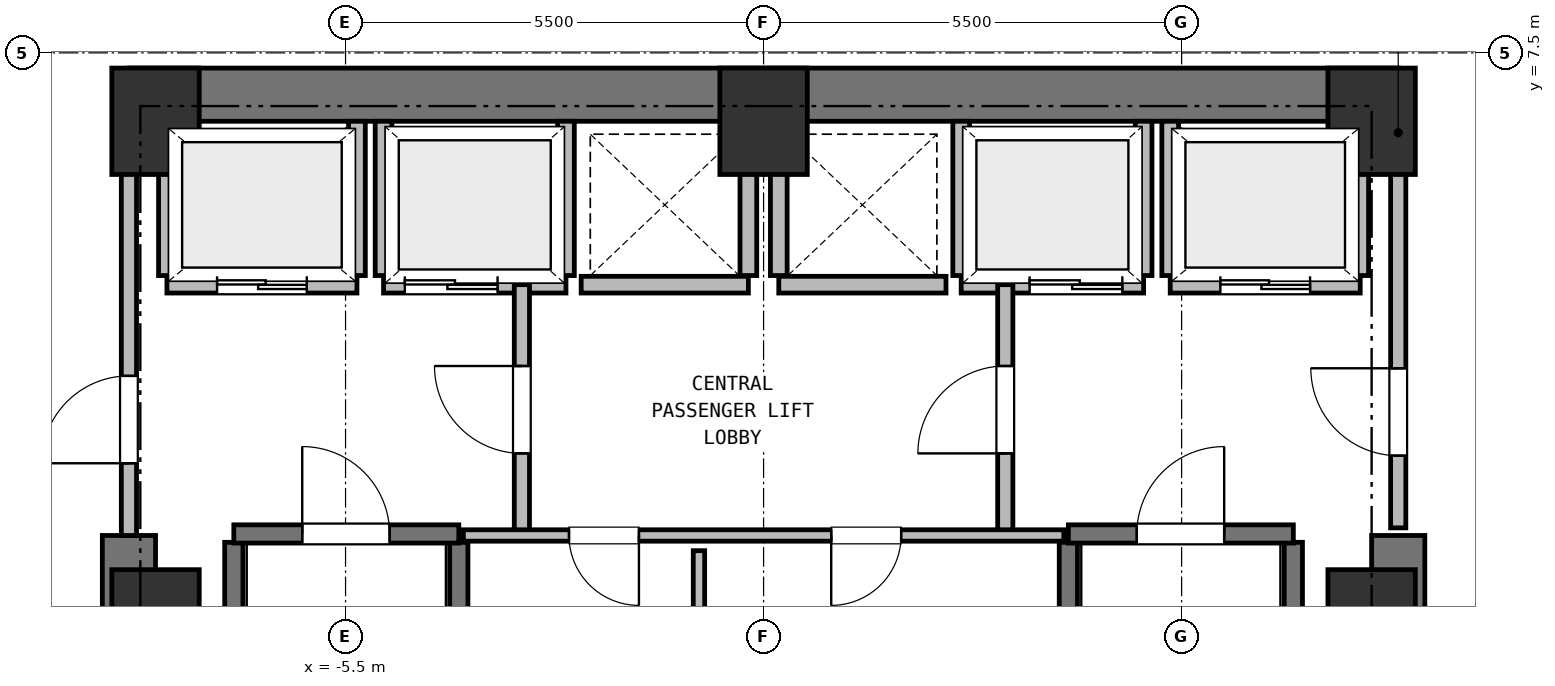
"""IFC4 building model, lengths in metres.
Left out: names, types, materials, properties, quantities, classifications, styles, units other than length and angle.
Written with IfcOpenShell. Run it as: python <this file> out.ifc"""

import sys

from ifc_helpers import new_model, si_unit, direction, frame, frame_2d, origin, origin_2d, place, context, subcontext, project, spatial, rectangle, extrude, element, fill, save


model = new_model("IFC4")
c1 = context("Model", 3, precision=1e-05, world=origin(), true_north=direction((0.0, 1.0)))
c2 = subcontext(c1, "Body", "Model", "MODEL_VIEW")
j1 = project(units=[si_unit("LENGTHUNIT", "METRE"), si_unit("PLANEANGLEUNIT", "RADIAN")], contexts=[c1])
p1 = place(None, origin())
s1 = spatial("IfcSite", under=j1, at=p1, CompositionType="ELEMENT")
p2 = place(p1, origin())
s2 = spatial("IfcBuilding", under=s1, at=p2, CompositionType="ELEMENT")
p3 = place(p2, frame((0.0, 0.0, 30.5)))
s3 = spatial("IfcBuildingStorey", under=s2, at=p3, CompositionType="ELEMENT", Elevation=30.5)
for number, where, z_axis, x_axis in (
    (1, (8.0, 0.0, 0.0), (0.0, 0.0, 1.0), (1.0, 0.0, 0.0)),
    (2, (8.0, 6.6, 0.0), (0.0, 0.0, 1.0), (1.0, 0.0, 0.0)),
    (3, (0.0, 6.6, 0.0), (0.0, 0.0, 1.0), (1.0, 0.0, 0.0)),
    (4, (-8.0, 6.6, 0.0), (0.0, 0.0, 1.0), (1.0, 0.0, 0.0)),
    (5, (-8.0, 0.0, 0.0), (0.0, 0.0, 1.0), (1.0, 0.0, 0.0)),
):
    element("IfcColumn", number, at=place(p3, frame(where, z_axis=z_axis, x_axis=x_axis)), inside=s3, PredefinedType="COLUMN", context=c2, shape_type="SweptSolid", body=[
        extrude(rectangle(XDim=1.15, YDim=1.4, at=origin_2d()), origin(), (0.0, 0.0, 1.0), 3.75),
    ])
p4 = place(p3, frame((-8.35, 6.95, 0.0), z_axis=(0.0, 0.0, 1.0), x_axis=(1.0, 0.0, 0.0)))
e6 = element("IfcWall", 6, at=p4, inside=s3, PredefinedType="SHEAR", context=c2, shape_type="SweptSolid", body=[
    extrude(rectangle(XDim=16.7, YDim=0.7, at=frame_2d((8.35, 0.0))), origin(), (0.0, 0.0, 1.0), 3.5),
])
for number, where, z_axis, x_axis in (
    (7, (-8.35, -6.95, 0.0), (0.0, 0.0, 1.0), (0.0, 1.0, 0.0)),
    (8, (8.35, -6.95, 0.0), (0.0, 0.0, 1.0), (0.0, 1.0, 0.0)),
):
    element("IfcWall", number, at=place(p3, frame(where, z_axis=z_axis, x_axis=x_axis)), inside=s3, PredefinedType="SHEAR", context=c2, shape_type="SweptSolid", body=[
        extrude(rectangle(XDim=8.1, YDim=0.7, at=frame_2d((4.05, 0.0))), origin(), (0.0, 0.0, 1.0), 3.5),
    ])
for number, where, z_axis, x_axis in (
    (9, (-6.97, -6.16, 0.0), (0.0, 0.0, 1.0), (0.0, 1.0, 0.0)),
    (10, (-4.01, -6.16, 0.0), (0.0, 0.0, 1.0), (0.0, 1.0, 0.0)),
):
    element("IfcWall", number, at=place(p3, frame(where, z_axis=z_axis, x_axis=x_axis)), inside=s3, PredefinedType="SHEAR", context=c2, shape_type="SweptSolid", body=[
        extrude(rectangle(XDim=7.22, YDim=0.24, at=frame_2d((3.61, 0.0))), origin(), (0.0, 0.0, 1.0), 3.5),
    ])
p5 = place(p3, frame((-6.97, 1.17, 0.0), z_axis=(0.0, 0.0, 1.0), x_axis=(1.0, 0.0, 0.0)))
e11 = element("IfcWall", 11, at=p5, inside=s3, PredefinedType="SHEAR", context=c2, shape_type="SweptSolid", body=[
    extrude(rectangle(XDim=2.96, YDim=0.24, at=frame_2d((1.48, 0.0))), origin(), (0.0, 0.0, 1.0), 3.5),
])
p6 = place(p5, frame((0.9, 0.0, 0.0)))
e12 = element("IfcOpeningElement", 12, at=p6, cuts=e11, PredefinedType="OPENING", context=c2, shape_type="SweptSolid", body=[
    extrude(rectangle(XDim=1.15, YDim=2.15, at=frame_2d((0.575, 1.075))), frame((0.0, 0.13, 0.0), z_axis=(0.0, -1.0, 0.0), x_axis=(1.0, 0.0, 0.0)), (0.0, 0.0, 1.0), 0.26),
])
for number, where, z_axis, x_axis in (
    (13, (4.01, -6.16, 0.0), (0.0, 0.0, 1.0), (0.0, 1.0, 0.0)),
    (14, (6.97, -6.16, 0.0), (0.0, 0.0, 1.0), (0.0, 1.0, 0.0)),
):
    element("IfcWall", number, at=place(p3, frame(where, z_axis=z_axis, x_axis=x_axis)), inside=s3, PredefinedType="SHEAR", context=c2, shape_type="SweptSolid", body=[
        extrude(rectangle(XDim=7.22, YDim=0.24, at=frame_2d((3.61, 0.0))), origin(), (0.0, 0.0, 1.0), 3.5),
    ])
p7 = place(p3, frame((4.01, 1.17, 0.0), z_axis=(0.0, 0.0, 1.0), x_axis=(1.0, 0.0, 0.0)))
e15 = element("IfcWall", 15, at=p7, inside=s3, PredefinedType="SHEAR", context=c2, shape_type="SweptSolid", body=[
    extrude(rectangle(XDim=2.96, YDim=0.24, at=frame_2d((1.48, 0.0))), origin(), (0.0, 0.0, 1.0), 3.5),
])
p8 = place(p7, frame((0.9, 0.0, 0.0)))
e16 = element("IfcOpeningElement", 16, at=p8, cuts=e15, PredefinedType="OPENING", context=c2, shape_type="SweptSolid", body=[
    extrude(rectangle(XDim=1.15, YDim=2.15, at=frame_2d((0.575, 1.075))), frame((0.0, 0.13, 0.0), z_axis=(0.0, -1.0, 0.0), x_axis=(1.0, 0.0, 0.0)), (0.0, 0.0, 1.0), 0.26),
])
p9 = place(p3, frame((-7.85, 4.45, 0.0), z_axis=(0.0, 0.0, 1.0), x_axis=(1.0, 0.0, 0.0)))
e17 = element("IfcWall", 17, at=p9, inside=s3, PredefinedType="PARTITIONING", context=c2, shape_type="SweptSolid", body=[
    extrude(rectangle(XDim=2.5, YDim=0.22, at=frame_2d((1.25, 0.0))), origin(), (0.0, 0.0, 1.0), 3.5),
])
p10 = place(p9, frame((0.66, 0.0, 0.0)))
e18 = element("IfcOpeningElement", 18, at=p10, cuts=e17, PredefinedType="OPENING", context=c2, shape_type="SweptSolid", body=[
    extrude(rectangle(XDim=1.18, YDim=2.15, at=frame_2d((0.59, 1.075))), frame((0.0, 0.12, 0.0), z_axis=(0.0, -1.0, 0.0), x_axis=(1.0, 0.0, 0.0)), (0.0, 0.0, 1.0), 0.24),
])
p11 = place(p3, frame((-7.85, 4.57, 0.0), z_axis=(0.0, 0.0, 1.0), x_axis=(0.0, 1.0, 0.0)))
e19 = element("IfcWall", 19, at=p11, inside=s3, PredefinedType="PARTITIONING", context=c2, shape_type="SweptSolid", body=[
    extrude(rectangle(XDim=2.03, YDim=0.22, at=frame_2d((1.015, 0.0))), origin(), (0.0, 0.0, 1.0), 3.08),
])
p12 = place(p3, frame((-5.35, 4.57, 0.0), z_axis=(0.0, 0.0, 1.0), x_axis=(0.0, 1.0, 0.0)))
e20 = element("IfcWall", 20, at=p12, inside=s3, PredefinedType="PARTITIONING", context=c2, shape_type="SweptSolid", body=[
    extrude(rectangle(XDim=2.03, YDim=0.22, at=frame_2d((1.015, 0.0))), origin(), (0.0, 0.0, 1.0), 3.5),
])
p13 = place(p3, frame((5.35, 4.45, 0.0), z_axis=(0.0, 0.0, 1.0), x_axis=(1.0, 0.0, 0.0)))
e21 = element("IfcWall", 21, at=p13, inside=s3, PredefinedType="PARTITIONING", context=c2, shape_type="SweptSolid", body=[
    extrude(rectangle(XDim=2.5, YDim=0.22, at=frame_2d((1.25, 0.0))), origin(), (0.0, 0.0, 1.0), 3.5),
])
p14 = place(p13, frame((0.66, 0.0, 0.0)))
e22 = element("IfcOpeningElement", 22, at=p14, cuts=e21, PredefinedType="OPENING", context=c2, shape_type="SweptSolid", body=[
    extrude(rectangle(XDim=1.18, YDim=2.15, at=frame_2d((0.59, 1.075))), frame((0.0, 0.12, 0.0), z_axis=(0.0, -1.0, 0.0), x_axis=(1.0, 0.0, 0.0)), (0.0, 0.0, 1.0), 0.24),
])
p15 = place(p3, frame((5.35, 4.57, 0.0), z_axis=(0.0, 0.0, 1.0), x_axis=(0.0, 1.0, 0.0)))
e23 = element("IfcWall", 23, at=p15, inside=s3, PredefinedType="PARTITIONING", context=c2, shape_type="SweptSolid", body=[
    extrude(rectangle(XDim=2.03, YDim=0.22, at=frame_2d((1.015, 0.0))), origin(), (0.0, 0.0, 1.0), 3.5),
])
p16 = place(p3, frame((7.85, 4.57, 0.0), z_axis=(0.0, 0.0, 1.0), x_axis=(0.0, 1.0, 0.0)))
e24 = element("IfcWall", 24, at=p16, inside=s3, PredefinedType="PARTITIONING", context=c2, shape_type="SweptSolid", body=[
    extrude(rectangle(XDim=2.03, YDim=0.22, at=frame_2d((1.015, 0.0))), origin(), (0.0, 0.0, 1.0), 3.08),
])
p17 = place(p3, frame((-5.0, 4.45, 0.0), z_axis=(0.0, 0.0, 1.0), x_axis=(1.0, 0.0, 0.0)))
e25 = element("IfcWall", 25, at=p17, inside=s3, PredefinedType="PARTITIONING", context=c2, shape_type="SweptSolid", body=[
    extrude(rectangle(XDim=2.4, YDim=0.22, at=frame_2d((1.2, 0.0))), origin(), (0.0, 0.0, 1.0), 3.5),
])
p18 = place(p17, frame((0.28, 0.0, 0.0)))
e26 = element("IfcOpeningElement", 26, at=p18, cuts=e25, PredefinedType="OPENING", context=c2, shape_type="SweptSolid", body=[
    extrude(rectangle(XDim=1.22, YDim=2.15, at=frame_2d((0.61, 1.075))), frame((0.0, 0.12, 0.0), z_axis=(0.0, -1.0, 0.0), x_axis=(1.0, 0.0, 0.0)), (0.0, 0.0, 1.0), 0.24),
])
for number, where, z_axis, x_axis in (
    (27, (-5.0, 4.57, 0.0), (0.0, 0.0, 1.0), (0.0, 1.0, 0.0)),
    (28, (-2.6, 4.57, 0.0), (0.0, 0.0, 1.0), (0.0, 1.0, 0.0)),
):
    element("IfcWall", number, at=place(p3, frame(where, z_axis=z_axis, x_axis=x_axis)), inside=s3, PredefinedType="PARTITIONING", context=c2, shape_type="SweptSolid", body=[
        extrude(rectangle(XDim=2.03, YDim=0.22, at=frame_2d((1.015, 0.0))), origin(), (0.0, 0.0, 1.0), 3.5),
    ])
p19 = place(p3, frame((2.6, 4.45, 0.0), z_axis=(0.0, 0.0, 1.0), x_axis=(1.0, 0.0, 0.0)))
e29 = element("IfcWall", 29, at=p19, inside=s3, PredefinedType="PARTITIONING", context=c2, shape_type="SweptSolid", body=[
    extrude(rectangle(XDim=2.4, YDim=0.22, at=frame_2d((1.2, 0.0))), origin(), (0.0, 0.0, 1.0), 3.5),
])
p20 = place(p19, frame((0.9, 0.0, 0.0)))
e30 = element("IfcOpeningElement", 30, at=p20, cuts=e29, PredefinedType="OPENING", context=c2, shape_type="SweptSolid", body=[
    extrude(rectangle(XDim=1.22, YDim=2.15, at=frame_2d((0.61, 1.075))), frame((0.0, 0.12, 0.0), z_axis=(0.0, -1.0, 0.0), x_axis=(1.0, 0.0, 0.0)), (0.0, 0.0, 1.0), 0.24),
])
for number, where, z_axis, x_axis in (
    (31, (2.6, 4.57, 0.0), (0.0, 0.0, 1.0), (0.0, 1.0, 0.0)),
    (32, (5.0, 4.57, 0.0), (0.0, 0.0, 1.0), (0.0, 1.0, 0.0)),
):
    element("IfcWall", number, at=place(p3, frame(where, z_axis=z_axis, x_axis=x_axis)), inside=s3, PredefinedType="PARTITIONING", context=c2, shape_type="SweptSolid", body=[
        extrude(rectangle(XDim=2.03, YDim=0.22, at=frame_2d((1.015, 0.0))), origin(), (0.0, 0.0, 1.0), 3.5),
    ])
p21 = place(p3, frame((-2.4, 4.45, 0.0), z_axis=(0.0, 0.0, 1.0), x_axis=(1.0, 0.0, 0.0)))
e33 = element("IfcWall", 33, at=p21, inside=s3, PredefinedType="PARTITIONING", context=c2, shape_type="SweptSolid", body=[
    extrude(rectangle(XDim=2.2, YDim=0.22, at=frame_2d((1.1, 0.0))), origin(), (0.0, 0.0, 1.0), 3.5),
])
p22 = place(p3, frame((-0.2, 4.57, 0.0), z_axis=(0.0, 0.0, 1.0), x_axis=(0.0, 1.0, 0.0)))
e34 = element("IfcWall", 34, at=p22, inside=s3, PredefinedType="PARTITIONING", context=c2, shape_type="SweptSolid", body=[
    extrude(rectangle(XDim=2.03, YDim=0.22, at=frame_2d((1.015, 0.0))), origin(), (0.0, 0.0, 1.0), 3.5),
])
p23 = place(p3, frame((0.2, 4.45, 0.0), z_axis=(0.0, 0.0, 1.0), x_axis=(1.0, 0.0, 0.0)))
e35 = element("IfcWall", 35, at=p23, inside=s3, PredefinedType="PARTITIONING", context=c2, shape_type="SweptSolid", body=[
    extrude(rectangle(XDim=2.2, YDim=0.22, at=frame_2d((1.1, 0.0))), origin(), (0.0, 0.0, 1.0), 3.5),
])
p24 = place(p3, frame((0.2, 4.57, 0.0), z_axis=(0.0, 0.0, 1.0), x_axis=(0.0, 1.0, 0.0)))
e36 = element("IfcWall", 36, at=p24, inside=s3, PredefinedType="PARTITIONING", context=c2, shape_type="SweptSolid", body=[
    extrude(rectangle(XDim=2.03, YDim=0.22, at=frame_2d((1.015, 0.0))), origin(), (0.0, 0.0, 1.0), 3.5),
])
p25 = place(p3, frame((-3.18, 1.15, 0.0), z_axis=(0.0, 0.0, 1.0), x_axis=(0.0, 1.0, 0.0)))
e37 = element("IfcWall", 37, at=p25, inside=s3, PredefinedType="PARTITIONING", context=c2, shape_type="SweptSolid", body=[
    extrude(rectangle(XDim=3.3, YDim=0.2, at=frame_2d((1.65, 0.0))), origin(), (0.0, 0.0, 1.0), 3.5),
])
p26 = place(p25, frame((1.08, 0.0, 0.0)))
e38 = element("IfcOpeningElement", 38, at=p26, cuts=e37, PredefinedType="OPENING", context=c2, shape_type="SweptSolid", body=[
    extrude(rectangle(XDim=1.15, YDim=2.15, at=frame_2d((0.575, 1.075))), frame((0.0, 0.11, 0.0), z_axis=(0.0, -1.0, 0.0), x_axis=(1.0, 0.0, 0.0)), (0.0, 0.0, 1.0), 0.22),
])
p27 = place(p3, frame((3.18, 1.15, 0.0), z_axis=(0.0, 0.0, 1.0), x_axis=(0.0, 1.0, 0.0)))
e39 = element("IfcWall", 39, at=p27, inside=s3, PredefinedType="PARTITIONING", context=c2, shape_type="SweptSolid", body=[
    extrude(rectangle(XDim=3.3, YDim=0.2, at=frame_2d((1.65, 0.0))), origin(), (0.0, 0.0, 1.0), 3.5),
])
p28 = place(p27, frame((1.08, 0.0, 0.0)))
e40 = element("IfcOpeningElement", 40, at=p28, cuts=e39, PredefinedType="OPENING", context=c2, shape_type="SweptSolid", body=[
    extrude(rectangle(XDim=1.15, YDim=2.15, at=frame_2d((0.575, 1.075))), frame((0.0, 0.11, 0.0), z_axis=(0.0, -1.0, 0.0), x_axis=(1.0, 0.0, 0.0)), (0.0, 0.0, 1.0), 0.22),
])
p29 = place(p3, frame((-8.35, 1.15, 0.0), z_axis=(0.0, 0.0, 1.0), x_axis=(0.0, 1.0, 0.0)))
e41 = element("IfcWall", 41, at=p29, inside=s3, PredefinedType="PARTITIONING", context=c2, shape_type="SweptSolid", body=[
    extrude(rectangle(XDim=5.4, YDim=0.2, at=frame_2d((2.7, 0.0))), origin(), (0.0, 0.0, 1.0), 3.5),
])
p30 = place(p29, frame((0.95, 0.0, 0.0)))
e42 = element("IfcOpeningElement", 42, at=p30, cuts=e41, PredefinedType="OPENING", context=c2, shape_type="SweptSolid", body=[
    extrude(rectangle(XDim=1.15, YDim=2.15, at=frame_2d((0.575, 1.075))), frame((0.0, 0.11, 0.0), z_axis=(0.0, -1.0, 0.0), x_axis=(1.0, 0.0, 0.0)), (0.0, 0.0, 1.0), 0.22),
])
p31 = place(p3, frame((8.35, 1.25, 0.0), z_axis=(0.0, 0.0, 1.0), x_axis=(0.0, 1.0, 0.0)))
e43 = element("IfcWall", 43, at=p31, inside=s3, PredefinedType="PARTITIONING", context=c2, shape_type="SweptSolid", body=[
    extrude(rectangle(XDim=5.3, YDim=0.2, at=frame_2d((2.65, 0.0))), origin(), (0.0, 0.0, 1.0), 3.5),
])
p32 = place(p31, frame((0.95, 0.0, 0.0)))
e44 = element("IfcOpeningElement", 44, at=p32, cuts=e43, PredefinedType="OPENING", context=c2, shape_type="SweptSolid", body=[
    extrude(rectangle(XDim=1.15, YDim=2.15, at=frame_2d((0.575, 1.075))), frame((0.0, 0.11, 0.0), z_axis=(0.0, -1.0, 0.0), x_axis=(1.0, 0.0, 0.0)), (0.0, 0.0, 1.0), 0.22),
])
p33 = place(p3, frame((3.95, 1.15, 0.0), z_axis=(0.0, 0.0, 1.0), x_axis=(-1.0, 0.0, 0.0)))
e45 = element("IfcWall", 45, at=p33, inside=s3, PredefinedType="PARTITIONING", context=c2, shape_type="SweptSolid", body=[
    extrude(rectangle(XDim=7.9, YDim=0.15, at=frame_2d((3.95, 0.0))), origin(), (0.0, 0.0, 1.0), 3.5),
])
p34 = place(p33, frame((5.59, 0.0, 0.0)))
e46 = element("IfcOpeningElement", 46, at=p34, cuts=e45, PredefinedType="OPENING", context=c2, shape_type="SweptSolid", body=[
    extrude(rectangle(XDim=0.92, YDim=2.05, at=frame_2d((0.46, 1.025))), frame((0.0, 0.085, 0.0), z_axis=(0.0, -1.0, 0.0), x_axis=(1.0, 0.0, 0.0)), (0.0, 0.0, 1.0), 0.17),
])
p35 = place(p33, frame((2.14, 0.0, 0.0)))
e47 = element("IfcOpeningElement", 47, at=p35, cuts=e45, PredefinedType="OPENING", context=c2, shape_type="SweptSolid", body=[
    extrude(rectangle(XDim=0.92, YDim=2.05, at=frame_2d((0.46, 1.025))), frame((0.0, 0.085, 0.0), z_axis=(0.0, -1.0, 0.0), x_axis=(1.0, 0.0, 0.0)), (0.0, 0.0, 1.0), 0.17),
])
p36 = place(p3, frame((-0.85, -4.08, 0.0), z_axis=(0.0, 0.0, 1.0), x_axis=(0.0, 1.0, 0.0)))
e48 = element("IfcWall", 48, at=p36, inside=s3, PredefinedType="PARTITIONING", context=c2, shape_type="SweptSolid", body=[
    extrude(rectangle(XDim=5.03, YDim=0.15, at=frame_2d((2.515, 0.0))), origin(), (0.0, 0.0, 1.0), 3.5),
])
for number, where, z_axis, x_axis in (
    (49, (8.578, 9.352, 0.0), (0.0, 0.0, 1.0), (0.707, -0.707, 0.0)),
    (50, (-10.752, 7.178, 0.0), (0.0, 0.0, 1.0), (0.707, 0.707, 0.0)),
):
    element("IfcWall", number, at=place(p3, frame(where, z_axis=z_axis, x_axis=x_axis)), inside=s3, PredefinedType="PARTITIONING", context=c2, shape_type="SweptSolid", body=[
        extrude(rectangle(XDim=3.074, YDim=0.15, at=frame_2d((1.537, 0.0))), origin(), (0.0, 0.0, 1.0), 3.5),
    ])
p37 = place(p6, origin())
e51 = element("IfcDoor", 51, at=p37, inside=s3, OperationType="SINGLE_SWING_LEFT", PredefinedType="DOOR", context=c2, shape_type="SweptSolid", body=[
    extrude(rectangle(XDim=1.15, YDim=2.15, at=frame_2d((0.575, 1.075))), frame((0.0, 0.025, 0.0), z_axis=(0.0, -1.0, 0.0), x_axis=(1.0, 0.0, 0.0)), (0.0, 0.0, 1.0), 0.05),
])
fill(e12, e51)
p38 = place(p8, origin())
e52 = element("IfcDoor", 52, at=p38, inside=s3, OperationType="SINGLE_SWING_RIGHT", PredefinedType="DOOR", context=c2, shape_type="SweptSolid", body=[
    extrude(rectangle(XDim=1.15, YDim=2.15, at=frame_2d((0.575, 1.075))), frame((0.0, 0.025, 0.0), z_axis=(0.0, -1.0, 0.0), x_axis=(1.0, 0.0, 0.0)), (0.0, 0.0, 1.0), 0.05),
])
fill(e16, e52)
p39 = place(p10, origin())
e53 = element("IfcDoor", 53, at=p39, inside=s3, OperationType="DOUBLE_DOOR_SLIDING", PredefinedType="DOOR", context=c2, shape_type="SweptSolid", body=[
    extrude(rectangle(XDim=1.18, YDim=2.15, at=frame_2d((0.59, 1.075))), frame((0.0, 0.025, 0.0), z_axis=(0.0, -1.0, 0.0), x_axis=(1.0, 0.0, 0.0)), (0.0, 0.0, 1.0), 0.05),
])
fill(e18, e53)
p40 = place(p14, origin())
e54 = element("IfcDoor", 54, at=p40, inside=s3, OperationType="DOUBLE_DOOR_SLIDING", PredefinedType="DOOR", context=c2, shape_type="SweptSolid", body=[
    extrude(rectangle(XDim=1.18, YDim=2.15, at=frame_2d((0.59, 1.075))), frame((0.0, 0.025, 0.0), z_axis=(0.0, -1.0, 0.0), x_axis=(1.0, 0.0, 0.0)), (0.0, 0.0, 1.0), 0.05),
])
fill(e22, e54)
p41 = place(p18, origin())
e55 = element("IfcDoor", 55, at=p41, inside=s3, OperationType="DOUBLE_DOOR_SLIDING", PredefinedType="DOOR", context=c2, shape_type="SweptSolid", body=[
    extrude(rectangle(XDim=1.22, YDim=2.15, at=frame_2d((0.61, 1.075))), frame((0.0, 0.025, 0.0), z_axis=(0.0, -1.0, 0.0), x_axis=(1.0, 0.0, 0.0)), (0.0, 0.0, 1.0), 0.05),
])
fill(e26, e55)
p42 = place(p20, origin())
e56 = element("IfcDoor", 56, at=p42, inside=s3, OperationType="DOUBLE_DOOR_SLIDING", PredefinedType="DOOR", context=c2, shape_type="SweptSolid", body=[
    extrude(rectangle(XDim=1.22, YDim=2.15, at=frame_2d((0.61, 1.075))), frame((0.0, 0.025, 0.0), z_axis=(0.0, -1.0, 0.0), x_axis=(1.0, 0.0, 0.0)), (0.0, 0.0, 1.0), 0.05),
])
fill(e30, e56)
p43 = place(p26, origin())
e57 = element("IfcDoor", 57, at=p43, inside=s3, OperationType="SINGLE_SWING_RIGHT", PredefinedType="DOOR", context=c2, shape_type="SweptSolid", body=[
    extrude(rectangle(XDim=1.15, YDim=2.15, at=frame_2d((0.575, 1.075))), frame((0.0, 0.025, 0.0), z_axis=(0.0, -1.0, 0.0), x_axis=(1.0, 0.0, 0.0)), (0.0, 0.0, 1.0), 0.05),
])
fill(e38, e57)
p44 = place(p28, origin())
e58 = element("IfcDoor", 58, at=p44, inside=s3, OperationType="SINGLE_SWING_LEFT", PredefinedType="DOOR", context=c2, shape_type="SweptSolid", body=[
    extrude(rectangle(XDim=1.15, YDim=2.15, at=frame_2d((0.575, 1.075))), frame((0.0, 0.025, 0.0), z_axis=(0.0, -1.0, 0.0), x_axis=(1.0, 0.0, 0.0)), (0.0, 0.0, 1.0), 0.05),
])
fill(e40, e58)
p45 = place(p30, origin())
e59 = element("IfcDoor", 59, at=p45, inside=s3, OperationType="SINGLE_SWING_LEFT", PredefinedType="DOOR", context=c2, shape_type="SweptSolid", body=[
    extrude(rectangle(XDim=1.15, YDim=2.15, at=frame_2d((0.575, 1.075))), frame((0.0, 0.025, 0.0), z_axis=(0.0, -1.0, 0.0), x_axis=(1.0, 0.0, 0.0)), (0.0, 0.0, 1.0), 0.05),
])
fill(e42, e59)
p46 = place(p32, origin())
e60 = element("IfcDoor", 60, at=p46, inside=s3, OperationType="SINGLE_SWING_RIGHT", PredefinedType="DOOR", context=c2, shape_type="SweptSolid", body=[
    extrude(rectangle(XDim=1.15, YDim=2.15, at=frame_2d((0.575, 1.075))), frame((0.0, 0.025, 0.0), z_axis=(0.0, -1.0, 0.0), x_axis=(1.0, 0.0, 0.0)), (0.0, 0.0, 1.0), 0.05),
])
fill(e44, e60)
p47 = place(p34, origin())
e61 = element("IfcDoor", 61, at=p47, inside=s3, OperationType="SINGLE_SWING_LEFT", PredefinedType="DOOR", context=c2, shape_type="SweptSolid", body=[
    extrude(rectangle(XDim=0.92, YDim=2.05, at=frame_2d((0.46, 1.025))), frame((0.0, 0.025, 0.0), z_axis=(0.0, -1.0, 0.0), x_axis=(1.0, 0.0, 0.0)), (0.0, 0.0, 1.0), 0.05),
])
fill(e46, e61)
p48 = place(p35, origin())
e62 = element("IfcDoor", 62, at=p48, inside=s3, OperationType="SINGLE_SWING_RIGHT", PredefinedType="DOOR", context=c2, shape_type="SweptSolid", body=[
    extrude(rectangle(XDim=0.92, YDim=2.05, at=frame_2d((0.46, 1.025))), frame((0.0, 0.025, 0.0), z_axis=(0.0, -1.0, 0.0), x_axis=(1.0, 0.0, 0.0)), (0.0, 0.0, 1.0), 0.05),
])
fill(e47, e62)
save(model, sys.argv[1])
